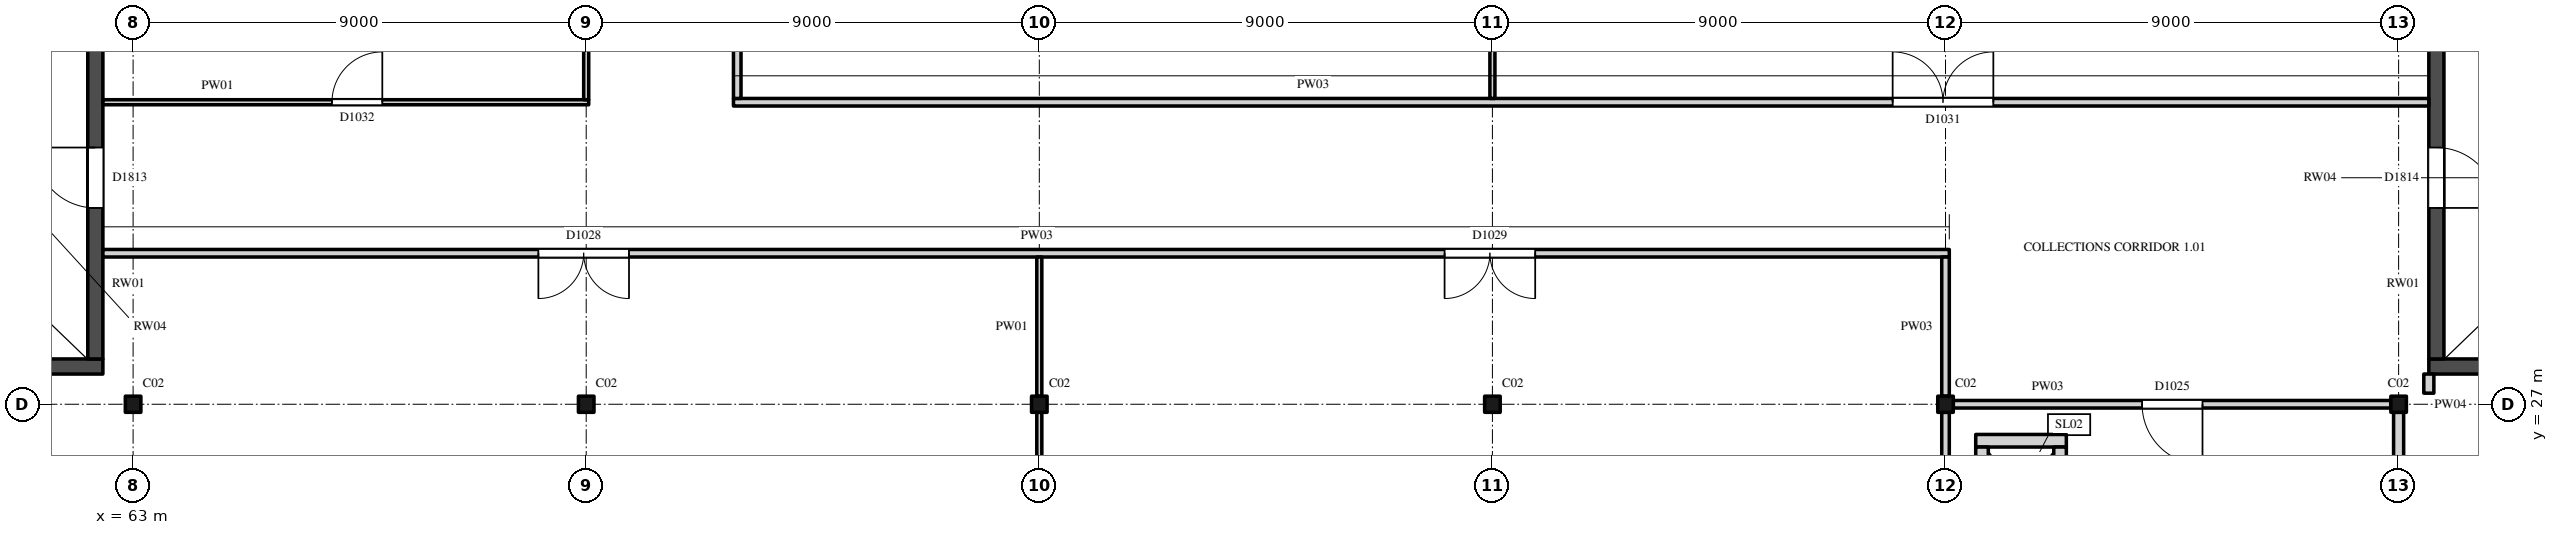
"""IFC4 building model, lengths in metres.
Left out: names, types, materials, properties, quantities, classifications, styles, units other than length and angle.
Written with IfcOpenShell. Run it as: python <this file> out.ifc"""

import sys

from ifc_helpers import new_model, si_unit, direction, frame, frame_2d, origin, origin_2d, place, context, subcontext, project, spatial, rectangle, i_section, extrude, element, fill, save


model = new_model("IFC4")
c1 = context("Model", 3, precision=1e-05, world=origin(), true_north=direction((0.0, 1.0)))
c2 = subcontext(c1, "Body", "Model", "MODEL_VIEW")
j1 = project(units=[si_unit("LENGTHUNIT", "METRE"), si_unit("PLANEANGLEUNIT", "RADIAN")], contexts=[c1])
p1 = place(None, origin())
s1 = spatial("IfcSite", under=j1, at=p1, CompositionType="ELEMENT")
p2 = place(p1, origin())
s2 = spatial("IfcBuilding", under=s1, at=p2, CompositionType="ELEMENT")
p3 = place(p2, frame((0.0, 0.0, 6.0)))
s3 = spatial("IfcBuildingStorey", under=s2, at=p3, CompositionType="ELEMENT", Elevation=6.0)
for number, where, z_axis, x_axis in (
    (1, (63.0, 27.0, 0.0), (0.0, 0.0, 1.0), (1.0, 0.0, 0.0)),
    (2, (72.0, 27.0, 0.0), (0.0, 0.0, 1.0), (1.0, 0.0, 0.0)),
    (3, (81.0, 27.0, 0.0), (0.0, 0.0, 1.0), (1.0, 0.0, 0.0)),
    (4, (90.0, 27.0, 0.0), (0.0, 0.0, 1.0), (1.0, 0.0, 0.0)),
    (5, (99.0, 27.0, 0.0), (0.0, 0.0, 1.0), (1.0, 0.0, 0.0)),
    (6, (108.0, 27.0, 0.0), (0.0, 0.0, 1.0), (1.0, 0.0, 0.0)),
):
    element("IfcColumn", number, at=place(p3, frame(where, z_axis=z_axis, x_axis=x_axis)), inside=s3, PredefinedType="COLUMN", context=c2, shape_type="SweptSolid", body=[
        extrude(i_section(OverallWidth=0.309, OverallDepth=0.321, WebThickness=0.014, FlangeThickness=0.022, FilletRadius=0.017, at=origin_2d()), origin(), (0.0, 0.0, 1.0), 5.0),
    ])
p4 = place(p3, frame((54.3, 27.75, 0.0), z_axis=(0.0, 0.0, 1.0), x_axis=(1.0, 0.0, 0.0)))
e7 = element("IfcWall", 7, at=p4, inside=s3, PredefinedType="SHEAR", context=c2, shape_type="SweptSolid", body=[
    extrude(rectangle(XDim=8.1, YDim=0.3, at=frame_2d((4.05, 0.0))), origin(), (0.0, 0.0, 1.0), 5.0),
])
p5 = place(p3, frame((62.25, 27.9, 0.0), z_axis=(0.0, 0.0, 1.0), x_axis=(0.0, 1.0, 0.0)))
e8 = element("IfcWall", 8, at=p5, inside=s3, PredefinedType="SHEAR", context=c2, shape_type="SweptSolid", body=[
    extrude(rectangle(XDim=7.2, YDim=0.3, at=frame_2d((3.6, 0.0))), origin(), (0.0, 0.0, 1.0), 5.0),
])
p6 = place(p5, frame((3.0, 0.0, 0.0)))
e9 = element("IfcOpeningElement", 9, at=p6, cuts=e8, PredefinedType="OPENING", context=c2, shape_type="SweptSolid", body=[
    extrude(rectangle(XDim=1.2, YDim=2.1, at=frame_2d((0.6, 1.05))), frame((0.0, 0.16, 0.0), z_axis=(0.0, -1.0, 0.0), x_axis=(1.0, 0.0, 0.0)), (0.0, 0.0, 1.0), 0.32),
])
p7 = place(p3, frame((108.6, 27.75, 0.0), z_axis=(0.0, 0.0, 1.0), x_axis=(1.0, 0.0, 0.0)))
e10 = element("IfcWall", 10, at=p7, inside=s3, PredefinedType="SHEAR", context=c2, shape_type="SweptSolid", body=[
    extrude(rectangle(XDim=8.1, YDim=0.3, at=frame_2d((4.05, 0.0))), origin(), (0.0, 0.0, 1.0), 5.0),
])
p8 = place(p3, frame((108.75, 27.9, 0.0), z_axis=(0.0, 0.0, 1.0), x_axis=(0.0, 1.0, 0.0)))
e11 = element("IfcWall", 11, at=p8, inside=s3, PredefinedType="SHEAR", context=c2, shape_type="SweptSolid", body=[
    extrude(rectangle(XDim=7.2, YDim=0.3, at=frame_2d((3.6, 0.0))), origin(), (0.0, 0.0, 1.0), 5.0),
])
p9 = place(p8, frame((3.0, 0.0, 0.0)))
e12 = element("IfcOpeningElement", 12, at=p9, cuts=e11, PredefinedType="OPENING", context=c2, shape_type="SweptSolid", body=[
    extrude(rectangle(XDim=1.2, YDim=2.1, at=frame_2d((0.6, 1.05))), frame((0.0, 0.16, 0.0), z_axis=(0.0, -1.0, 0.0), x_axis=(1.0, 0.0, 0.0)), (0.0, 0.0, 1.0), 0.32),
])
p10 = place(p3, frame((99.6, 26.275, 0.0), z_axis=(0.0, 0.0, 1.0), x_axis=(1.0, 0.0, 0.0)))
e13 = element("IfcWall", 13, at=p10, inside=s3, PredefinedType="STANDARD", context=c2, shape_type="SweptSolid", body=[
    extrude(rectangle(XDim=1.8, YDim=0.25, at=frame_2d((0.9, 0.0))), origin(), (0.0, 0.0, 1.0), 5.0),
])
p11 = place(p3, frame((99.725, 24.25, 0.0), z_axis=(0.0, 0.0, 1.0), x_axis=(0.0, 1.0, 0.0)))
e14 = element("IfcWall", 14, at=p11, inside=s3, PredefinedType="STANDARD", context=c2, shape_type="SweptSolid", body=[
    extrude(rectangle(XDim=1.9, YDim=0.25, at=frame_2d((0.95, 0.0))), origin(), (0.0, 0.0, 1.0), 5.0),
])
p12 = place(p3, frame((101.275, 24.25, 0.0), z_axis=(0.0, 0.0, 1.0), x_axis=(0.0, 1.0, 0.0)))
e15 = element("IfcWall", 15, at=p12, inside=s3, PredefinedType="STANDARD", context=c2, shape_type="SweptSolid", body=[
    extrude(rectangle(XDim=1.9, YDim=0.25, at=frame_2d((0.95, 0.0))), origin(), (0.0, 0.0, 1.0), 5.0),
])
p13 = place(p12, frame((0.5, 0.0, 0.0)))
e16 = element("IfcOpeningElement", 16, at=p13, cuts=e15, PredefinedType="OPENING", context=c2, shape_type="SweptSolid", body=[
    extrude(rectangle(XDim=0.9, YDim=2.1, at=frame_2d((0.45, 1.05))), frame((0.0, 0.135, 0.0), z_axis=(0.0, -1.0, 0.0), x_axis=(1.0, 0.0, 0.0)), (0.0, 0.0, 1.0), 0.27),
])
p14 = place(p3, frame((99.155, 27.0, 0.0), z_axis=(0.0, 0.0, 1.0), x_axis=(1.0, 0.0, 0.0)))
e17 = element("IfcWall", 17, at=p14, inside=s3, PredefinedType="PARTITIONING", context=c2, shape_type="SweptSolid", body=[
    extrude(rectangle(XDim=8.691, YDim=0.15, at=frame_2d((4.345, 0.0))), origin(), (0.0, 0.0, 1.0), 4.419),
])
p15 = place(p14, frame((3.75, 0.0, 0.0)))
e18 = element("IfcOpeningElement", 18, at=p15, cuts=e17, PredefinedType="OPENING", context=c2, shape_type="SweptSolid", body=[
    extrude(rectangle(XDim=1.2, YDim=2.4, at=frame_2d((0.6, 1.2))), frame((0.0, 0.085, 0.0), z_axis=(0.0, -1.0, 0.0), x_axis=(1.0, 0.0, 0.0)), (0.0, 0.0, 1.0), 0.17),
])
p16 = place(p3, frame((62.4, 30.0, 0.0), z_axis=(0.0, 0.0, 1.0), x_axis=(1.0, 0.0, 0.0)))
e19 = element("IfcWall", 19, at=p16, inside=s3, PredefinedType="PARTITIONING", context=c2, shape_type="SweptSolid", body=[
    extrude(rectangle(XDim=36.675, YDim=0.15, at=frame_2d((18.337, 0.0))), origin(), (0.0, 0.0, 1.0), 4.419),
])
p17 = place(p16, frame((8.65, 0.0, 0.0)))
e20 = element("IfcOpeningElement", 20, at=p17, cuts=e19, PredefinedType="OPENING", context=c2, shape_type="SweptSolid", body=[
    extrude(rectangle(XDim=1.8, YDim=2.1, at=frame_2d((0.9, 1.05))), frame((0.0, 0.085, 0.0), z_axis=(0.0, -1.0, 0.0), x_axis=(1.0, 0.0, 0.0)), (0.0, 0.0, 1.0), 0.17),
])
p18 = place(p16, frame((26.65, 0.0, 0.0)))
e21 = element("IfcOpeningElement", 21, at=p18, cuts=e19, PredefinedType="OPENING", context=c2, shape_type="SweptSolid", body=[
    extrude(rectangle(XDim=1.8, YDim=2.1, at=frame_2d((0.9, 1.05))), frame((0.0, 0.085, 0.0), z_axis=(0.0, -1.0, 0.0), x_axis=(1.0, 0.0, 0.0)), (0.0, 0.0, 1.0), 0.17),
])
p19 = place(p3, frame((62.4, 33.0, 0.0), z_axis=(0.0, 0.0, 1.0), x_axis=(1.0, 0.0, 0.0)))
e22 = element("IfcWall", 22, at=p19, inside=s3, PredefinedType="PARTITIONING", context=c2, shape_type="SweptSolid", body=[
    extrude(rectangle(XDim=9.65, YDim=0.1, at=frame_2d((4.825, 0.0))), origin(), (0.0, 0.0, 1.0), 4.419),
])
p20 = place(p19, frame((4.55, 0.0, 0.0)))
e23 = element("IfcOpeningElement", 23, at=p20, cuts=e22, PredefinedType="OPENING", context=c2, shape_type="SweptSolid", body=[
    extrude(rectangle(XDim=1.0, YDim=2.1, at=frame_2d((0.5, 1.05))), frame((0.0, 0.06, 0.0), z_axis=(0.0, -1.0, 0.0), x_axis=(1.0, 0.0, 0.0)), (0.0, 0.0, 1.0), 0.12),
])
p21 = place(p3, frame((74.925, 33.0, 0.0), z_axis=(0.0, 0.0, 1.0), x_axis=(1.0, 0.0, 0.0)))
e24 = element("IfcWall", 24, at=p21, inside=s3, PredefinedType="PARTITIONING", context=c2, shape_type="SweptSolid", body=[
    extrude(rectangle(XDim=33.675, YDim=0.15, at=frame_2d((16.837, 0.0))), origin(), (0.0, 0.0, 1.0), 4.419),
])
p22 = place(p21, frame((23.025, 0.0, 0.0)))
e25 = element("IfcOpeningElement", 25, at=p22, cuts=e24, PredefinedType="OPENING", context=c2, shape_type="SweptSolid", body=[
    extrude(rectangle(XDim=2.0, YDim=2.4, at=frame_2d((1.0, 1.2))), frame((0.0, 0.085, 0.0), z_axis=(0.0, -1.0, 0.0), x_axis=(1.0, 0.0, 0.0)), (0.0, 0.0, 1.0), 0.17),
])
p23 = place(p3, frame((72.0, 33.05, 0.0), z_axis=(0.0, 0.0, 1.0), x_axis=(0.0, 1.0, 0.0)))
e26 = element("IfcWall", 26, at=p23, inside=s3, PredefinedType="PARTITIONING", context=c2, shape_type="SweptSolid", body=[
    extrude(rectangle(XDim=2.79, YDim=0.1, at=frame_2d((1.395, 0.0))), origin(), (0.0, 0.0, 1.0), 4.297),
])
p24 = place(p3, frame((75.0, 33.075, 0.0), z_axis=(0.0, 0.0, 1.0), x_axis=(0.0, 1.0, 0.0)))
e27 = element("IfcWall", 27, at=p24, inside=s3, PredefinedType="PARTITIONING", context=c2, shape_type="SweptSolid", body=[
    extrude(rectangle(XDim=5.85, YDim=0.15, at=frame_2d((2.925, 0.0))), origin(), (0.0, 0.0, 1.0), 4.825),
])
p25 = place(p3, frame((81.0, 18.16, 0.0), z_axis=(0.0, 0.0, 1.0), x_axis=(0.0, 1.0, 0.0)))
e28 = element("IfcWall", 28, at=p25, inside=s3, PredefinedType="PARTITIONING", context=c2, shape_type="SweptSolid", body=[
    extrude(rectangle(XDim=8.679, YDim=0.1, at=frame_2d((4.34, 0.0))), origin(), (0.0, 0.0, 1.0), 4.297),
])
for number, where, z_axis, x_axis in (
    (29, (81.0, 27.16, 0.0), (0.0, 0.0, 1.0), (0.0, 1.0, 0.0)),
    (30, (90.0, 33.075, 0.0), (0.0, 0.0, 1.0), (0.0, 1.0, 0.0)),
):
    element("IfcWall", number, at=place(p3, frame(where, z_axis=z_axis, x_axis=x_axis)), inside=s3, PredefinedType="PARTITIONING", context=c2, shape_type="SweptSolid", body=[
        extrude(rectangle(XDim=2.765, YDim=0.1, at=frame_2d((1.382, 0.0))), origin(), (0.0, 0.0, 1.0), 4.297),
    ])
p26 = place(p3, frame((99.0, 18.16, 0.0), z_axis=(0.0, 0.0, 1.0), x_axis=(0.0, 1.0, 0.0)))
e31 = element("IfcWall", 31, at=p26, inside=s3, PredefinedType="PARTITIONING", context=c2, shape_type="SweptSolid", body=[
    extrude(rectangle(XDim=8.679, YDim=0.15, at=frame_2d((4.34, 0.0))), origin(), (0.0, 0.0, 1.0), 4.297),
])
p27 = place(p3, frame((99.0, 27.16, 0.0), z_axis=(0.0, 0.0, 1.0), x_axis=(0.0, 1.0, 0.0)))
e32 = element("IfcWall", 32, at=p27, inside=s3, PredefinedType="PARTITIONING", context=c2, shape_type="SweptSolid", body=[
    extrude(rectangle(XDim=2.765, YDim=0.15, at=frame_2d((1.382, 0.0))), origin(), (0.0, 0.0, 1.0), 4.297),
])
p28 = place(p3, frame((108.0, 18.16, 0.0), z_axis=(0.0, 0.0, 1.0), x_axis=(0.0, 1.0, 0.0)))
e33 = element("IfcWall", 33, at=p28, inside=s3, PredefinedType="PARTITIONING", context=c2, shape_type="SweptSolid", body=[
    extrude(rectangle(XDim=8.679, YDim=0.2, at=frame_2d((4.34, 0.0))), origin(), (0.0, 0.0, 1.0), 4.297),
])
p29 = place(p3, frame((108.6, 27.22, 0.0), z_axis=(0.0, 0.0, 1.0), x_axis=(0.0, 1.0, 0.0)))
e34 = element("IfcWall", 34, at=p29, inside=s3, PredefinedType="PARTITIONING", context=c2, shape_type="SweptSolid", body=[
    extrude(rectangle(XDim=0.38, YDim=0.2, at=frame_2d((0.19, 0.0))), origin(), (0.0, 0.0, 1.0), 4.825),
])
p30 = place(p6, origin())
e35 = element("IfcDoor", 35, at=p30, inside=s3, OperationType="SINGLE_SWING_LEFT", PredefinedType="DOOR", context=c2, shape_type="SweptSolid", body=[
    extrude(rectangle(XDim=1.2, YDim=2.1, at=frame_2d((0.6, 1.05))), frame((0.0, 0.025, 0.0), z_axis=(0.0, -1.0, 0.0), x_axis=(1.0, 0.0, 0.0)), (0.0, 0.0, 1.0), 0.05),
])
fill(e9, e35)
p31 = place(p9, origin())
e36 = element("IfcDoor", 36, at=p31, inside=s3, OperationType="SINGLE_SWING_LEFT", PredefinedType="DOOR", context=c2, shape_type="SweptSolid", body=[
    extrude(rectangle(XDim=1.2, YDim=2.1, at=frame_2d((0.6, 1.05))), frame((0.0, 0.025, 0.0), z_axis=(0.0, -1.0, 0.0), x_axis=(1.0, 0.0, 0.0)), (0.0, 0.0, 1.0), 0.05),
])
fill(e12, e36)
p32 = place(p15, origin())
e37 = element("IfcDoor", 37, at=p32, inside=s3, OperationType="SINGLE_SWING_RIGHT", PredefinedType="DOOR", context=c2, shape_type="SweptSolid", body=[
    extrude(rectangle(XDim=1.2, YDim=2.4, at=frame_2d((0.6, 1.2))), frame((0.0, 0.025, 0.0), z_axis=(0.0, -1.0, 0.0), x_axis=(1.0, 0.0, 0.0)), (0.0, 0.0, 1.0), 0.05),
])
fill(e18, e37)
p33 = place(p17, origin())
e38 = element("IfcDoor", 38, at=p33, inside=s3, OperationType="DOUBLE_DOOR_SINGLE_SWING", PredefinedType="DOOR", context=c2, shape_type="SweptSolid", body=[
    extrude(rectangle(XDim=1.8, YDim=2.1, at=frame_2d((0.9, 1.05))), frame((0.0, 0.025, 0.0), z_axis=(0.0, -1.0, 0.0), x_axis=(1.0, 0.0, 0.0)), (0.0, 0.0, 1.0), 0.05),
])
fill(e20, e38)
p34 = place(p18, origin())
e39 = element("IfcDoor", 39, at=p34, inside=s3, OperationType="DOUBLE_DOOR_SINGLE_SWING", PredefinedType="DOOR", context=c2, shape_type="SweptSolid", body=[
    extrude(rectangle(XDim=1.8, YDim=2.1, at=frame_2d((0.9, 1.05))), frame((0.0, 0.025, 0.0), z_axis=(0.0, -1.0, 0.0), x_axis=(1.0, 0.0, 0.0)), (0.0, 0.0, 1.0), 0.05),
])
fill(e21, e39)
p35 = place(p22, origin())
e40 = element("IfcDoor", 40, at=p35, inside=s3, OperationType="DOUBLE_DOOR_SINGLE_SWING", PredefinedType="DOOR", context=c2, shape_type="SweptSolid", body=[
    extrude(rectangle(XDim=2.0, YDim=2.4, at=frame_2d((1.0, 1.2))), frame((0.0, 0.025, 0.0), z_axis=(0.0, -1.0, 0.0), x_axis=(1.0, 0.0, 0.0)), (0.0, 0.0, 1.0), 0.05),
])
fill(e25, e40)
p36 = place(p20, origin())
e41 = element("IfcDoor", 41, at=p36, inside=s3, OperationType="SINGLE_SWING_LEFT", PredefinedType="DOOR", context=c2, shape_type="SweptSolid", body=[
    extrude(rectangle(XDim=1.0, YDim=2.1, at=frame_2d((0.5, 1.05))), frame((0.0, 0.025, 0.0), z_axis=(0.0, -1.0, 0.0), x_axis=(1.0, 0.0, 0.0)), (0.0, 0.0, 1.0), 0.05),
])
fill(e23, e41)
save(model, sys.argv[1])
